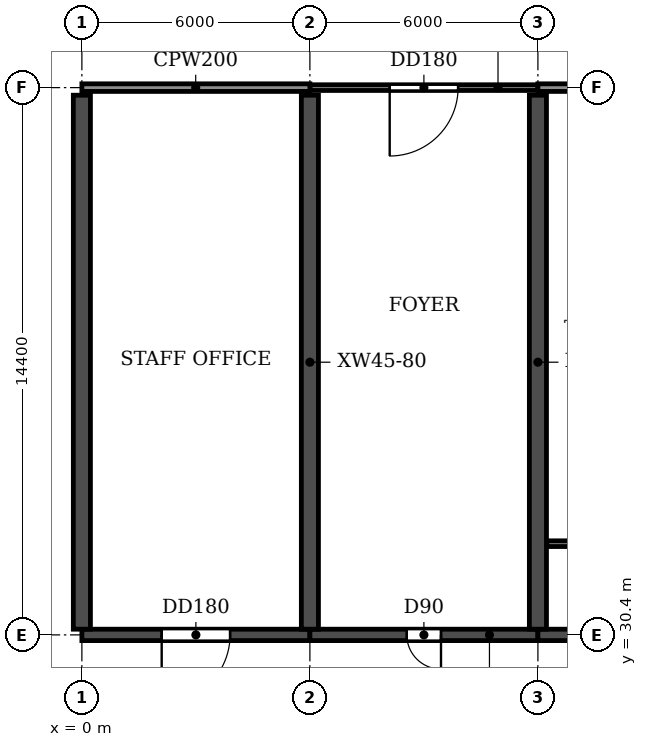
"""IFC4 building model, lengths in metres.
Left out: names, types, materials, properties, quantities, classifications, styles, units other than length and angle.
Written with IfcOpenShell. Run it as: python <this file> out.ifc"""

import sys

from ifc_helpers import new_model, si_unit, direction, frame, frame_2d, origin, place, context, subcontext, project, spatial, rectangle, extrude, element, fill, save


model = new_model("IFC4")
c1 = context("Model", 3, precision=1e-05, world=origin(), true_north=direction((0.0, 1.0)))
c2 = subcontext(c1, "Body", "Model", "MODEL_VIEW")
j1 = project(units=[si_unit("LENGTHUNIT", "METRE"), si_unit("PLANEANGLEUNIT", "RADIAN")], contexts=[c1])
p1 = place(None, origin())
s1 = spatial("IfcSite", under=j1, at=p1, CompositionType="ELEMENT")
p2 = place(p1, origin())
s2 = spatial("IfcBuilding", under=s1, at=p2, CompositionType="ELEMENT")
p3 = place(p2, frame((0.0, 0.0, 15.0)))
s3 = spatial("IfcBuildingStorey", under=s2, at=p3, CompositionType="ELEMENT", Elevation=15.0)
for number, where, z_axis, x_axis in (
    (1, (0.0, 30.55, 0.0), (0.0, 0.0, 1.0), (0.0, 1.0, 0.0)),
    (2, (6.0, 30.55, 0.0), (0.0, 0.0, 1.0), (0.0, 1.0, 0.0)),
    (3, (12.0, 30.55, 0.0), (0.0, 0.0, 1.0), (0.0, 1.0, 0.0)),
):
    element("IfcWall", number, at=place(p3, frame(where, z_axis=z_axis, x_axis=x_axis)), inside=s3, PredefinedType="SHEAR", context=c2, shape_type="SweptSolid", body=[
        extrude(rectangle(XDim=14.05, YDim=0.45, at=frame_2d((7.025, 0.0))), origin(), (0.0, 0.0, 1.0), 3.92),
    ])
p4 = place(p3, frame((0.0, 30.4, 0.0), z_axis=(0.0, 0.0, 1.0), x_axis=(1.0, 0.0, 0.0)))
e4 = element("IfcWall", 4, at=p4, inside=s3, PredefinedType="SHEAR", context=c2, shape_type="SweptSolid", body=[
    extrude(rectangle(XDim=6.0, YDim=0.3, at=frame_2d((3.0, 0.0))), origin(), (0.0, 0.0, 1.0), 3.32),
])
p5 = place(p4, frame((2.1, 0.0, 0.0)))
e5 = element("IfcOpeningElement", 5, at=p5, cuts=e4, PredefinedType="OPENING", context=c2, shape_type="SweptSolid", body=[
    extrude(rectangle(XDim=1.8, YDim=2.1, at=frame_2d((0.9, 1.05))), frame((0.0, 0.16, 0.0), z_axis=(0.0, -1.0, 0.0), x_axis=(1.0, 0.0, 0.0)), (0.0, 0.0, 1.0), 0.32),
])
p6 = place(p3, frame((6.0, 30.4, 0.0), z_axis=(0.0, 0.0, 1.0), x_axis=(1.0, 0.0, 0.0)))
e6 = element("IfcWall", 6, at=p6, inside=s3, PredefinedType="SHEAR", context=c2, shape_type="SweptSolid", body=[
    extrude(rectangle(XDim=6.0, YDim=0.3, at=frame_2d((3.0, 0.0))), origin(), (0.0, 0.0, 1.0), 3.32),
])
p7 = place(p6, frame((2.55, 0.0, 0.0)))
e7 = element("IfcOpeningElement", 7, at=p7, cuts=e6, PredefinedType="OPENING", context=c2, shape_type="SweptSolid", body=[
    extrude(rectangle(XDim=0.9, YDim=2.1, at=frame_2d((0.45, 1.05))), frame((0.0, 0.16, 0.0), z_axis=(0.0, -1.0, 0.0), x_axis=(1.0, 0.0, 0.0)), (0.0, 0.0, 1.0), 0.32),
])
p8 = place(p3, frame((12.0, 30.4, 0.0), z_axis=(0.0, 0.0, 1.0), x_axis=(1.0, 0.0, 0.0)))
e8 = element("IfcWall", 8, at=p8, inside=s3, PredefinedType="SHEAR", context=c2, shape_type="SweptSolid", body=[
    extrude(rectangle(XDim=6.0, YDim=0.3, at=frame_2d((3.0, 0.0))), origin(), (0.0, 0.0, 1.0), 3.32),
])
p9 = place(p8, frame((2.55, 0.0, 0.0)))
e9 = element("IfcOpeningElement", 9, at=p9, cuts=e8, PredefinedType="OPENING", context=c2, shape_type="SweptSolid", body=[
    extrude(rectangle(XDim=0.9, YDim=2.1, at=frame_2d((0.45, 1.05))), frame((0.0, 0.16, 0.0), z_axis=(0.0, -1.0, 0.0), x_axis=(1.0, 0.0, 0.0)), (0.0, 0.0, 1.0), 0.32),
])
p10 = place(p3, frame((12.235, 32.8, 0.0), z_axis=(0.0, 0.0, 1.0), x_axis=(1.0, 0.0, 0.0)))
e10 = element("IfcWall", 10, at=p10, inside=s3, PredefinedType="PARTITIONING", context=c2, shape_type="SweptSolid", body=[
    extrude(rectangle(XDim=5.53, YDim=0.15, at=frame_2d((2.765, 0.0))), origin(), (0.0, 0.0, 1.0), 3.92),
])
p11 = place(p10, frame((1.065, 0.0, 0.0)))
e11 = element("IfcOpeningElement", 11, at=p11, cuts=e10, PredefinedType="OPENING", context=c2, shape_type="SweptSolid", body=[
    extrude(rectangle(XDim=1.0, YDim=2.1, at=frame_2d((0.5, 1.05))), frame((0.0, 0.085, 0.0), z_axis=(0.0, -1.0, 0.0), x_axis=(1.0, 0.0, 0.0)), (0.0, 0.0, 1.0), 0.17),
])
p12 = place(p10, frame((4.065, 0.0, 0.0)))
e12 = element("IfcOpeningElement", 12, at=p12, cuts=e10, PredefinedType="OPENING", context=c2, shape_type="SweptSolid", body=[
    extrude(rectangle(XDim=1.0, YDim=2.1, at=frame_2d((0.5, 1.05))), frame((0.0, 0.085, 0.0), z_axis=(0.0, -1.0, 0.0), x_axis=(1.0, 0.0, 0.0)), (0.0, 0.0, 1.0), 0.17),
])
p13 = place(p3, frame((6.0, 44.8, 0.0), z_axis=(0.0, 0.0, 1.0), x_axis=(1.0, 0.0, 0.0)))
e13 = element("IfcWall", 13, at=p13, inside=s3, PredefinedType="PARTITIONING", context=c2, shape_type="SweptSolid", body=[
    extrude(rectangle(XDim=6.0, YDim=0.15, at=frame_2d((3.0, 0.0))), origin(), (0.0, 0.0, 1.0), 3.92),
])
p14 = place(p13, frame((2.1, 0.0, 0.0)))
e14 = element("IfcOpeningElement", 14, at=p14, cuts=e13, PredefinedType="OPENING", context=c2, shape_type="SweptSolid", body=[
    extrude(rectangle(XDim=1.8, YDim=2.1, at=frame_2d((0.9, 1.05))), frame((0.0, 0.085, 0.0), z_axis=(0.0, -1.0, 0.0), x_axis=(1.0, 0.0, 0.0)), (0.0, 0.0, 1.0), 0.17),
])
p15 = place(p3, frame((0.0, 44.8, 0.0), z_axis=(0.0, 0.0, 1.0), x_axis=(1.0, 0.0, 0.0)))
e15 = element("IfcWall", 15, at=p15, inside=s3, PredefinedType="PARTITIONING", context=c2, shape_type="SweptSolid", body=[
    extrude(rectangle(XDim=6.0, YDim=0.2, at=frame_2d((3.0, 0.0))), origin(), (0.0, 0.0, 1.0), 3.92),
])
p16 = place(p3, frame((12.0, 44.8, 0.0), z_axis=(0.0, 0.0, 1.0), x_axis=(1.0, 0.0, 0.0)))
e16 = element("IfcWall", 16, at=p16, inside=s3, PredefinedType="PARTITIONING", context=c2, shape_type="SweptSolid", body=[
    extrude(rectangle(XDim=18.0, YDim=0.2, at=frame_2d((9.0, 0.0))), origin(), (0.0, 0.0, 1.0), 3.92),
])
p17 = place(p5, frame((1.8, 0.0, 0.0), z_axis=(0.0, 0.0, 1.0), x_axis=(-1.0, 0.0, 0.0)))
e17 = element("IfcDoor", 17, at=p17, inside=s3, OperationType="DOUBLE_DOOR_SINGLE_SWING", PredefinedType="DOOR", context=c2, shape_type="SweptSolid", body=[
    extrude(rectangle(XDim=1.8, YDim=2.1, at=frame_2d((0.9, 1.05))), frame((0.0, 0.025, 0.0), z_axis=(0.0, -1.0, 0.0), x_axis=(1.0, 0.0, 0.0)), (0.0, 0.0, 1.0), 0.05),
])
fill(e5, e17)
p18 = place(p7, frame((0.9, 0.0, 0.0), z_axis=(0.0, 0.0, 1.0), x_axis=(-1.0, 0.0, 0.0)))
e18 = element("IfcDoor", 18, at=p18, inside=s3, OperationType="SINGLE_SWING_LEFT", PredefinedType="DOOR", context=c2, shape_type="SweptSolid", body=[
    extrude(rectangle(XDim=0.9, YDim=2.1, at=frame_2d((0.45, 1.05))), frame((0.0, 0.025, 0.0), z_axis=(0.0, -1.0, 0.0), x_axis=(1.0, 0.0, 0.0)), (0.0, 0.0, 1.0), 0.05),
])
fill(e7, e18)
p19 = place(p14, frame((1.8, 0.0, 0.0), z_axis=(0.0, 0.0, 1.0), x_axis=(-1.0, 0.0, 0.0)))
e19 = element("IfcDoor", 19, at=p19, inside=s3, OperationType="DOUBLE_DOOR_SINGLE_SWING", PredefinedType="DOOR", context=c2, shape_type="SweptSolid", body=[
    extrude(rectangle(XDim=1.8, YDim=2.1, at=frame_2d((0.9, 1.05))), frame((0.0, 0.025, 0.0), z_axis=(0.0, -1.0, 0.0), x_axis=(1.0, 0.0, 0.0)), (0.0, 0.0, 1.0), 0.05),
])
fill(e14, e19)
save(model, sys.argv[1])
